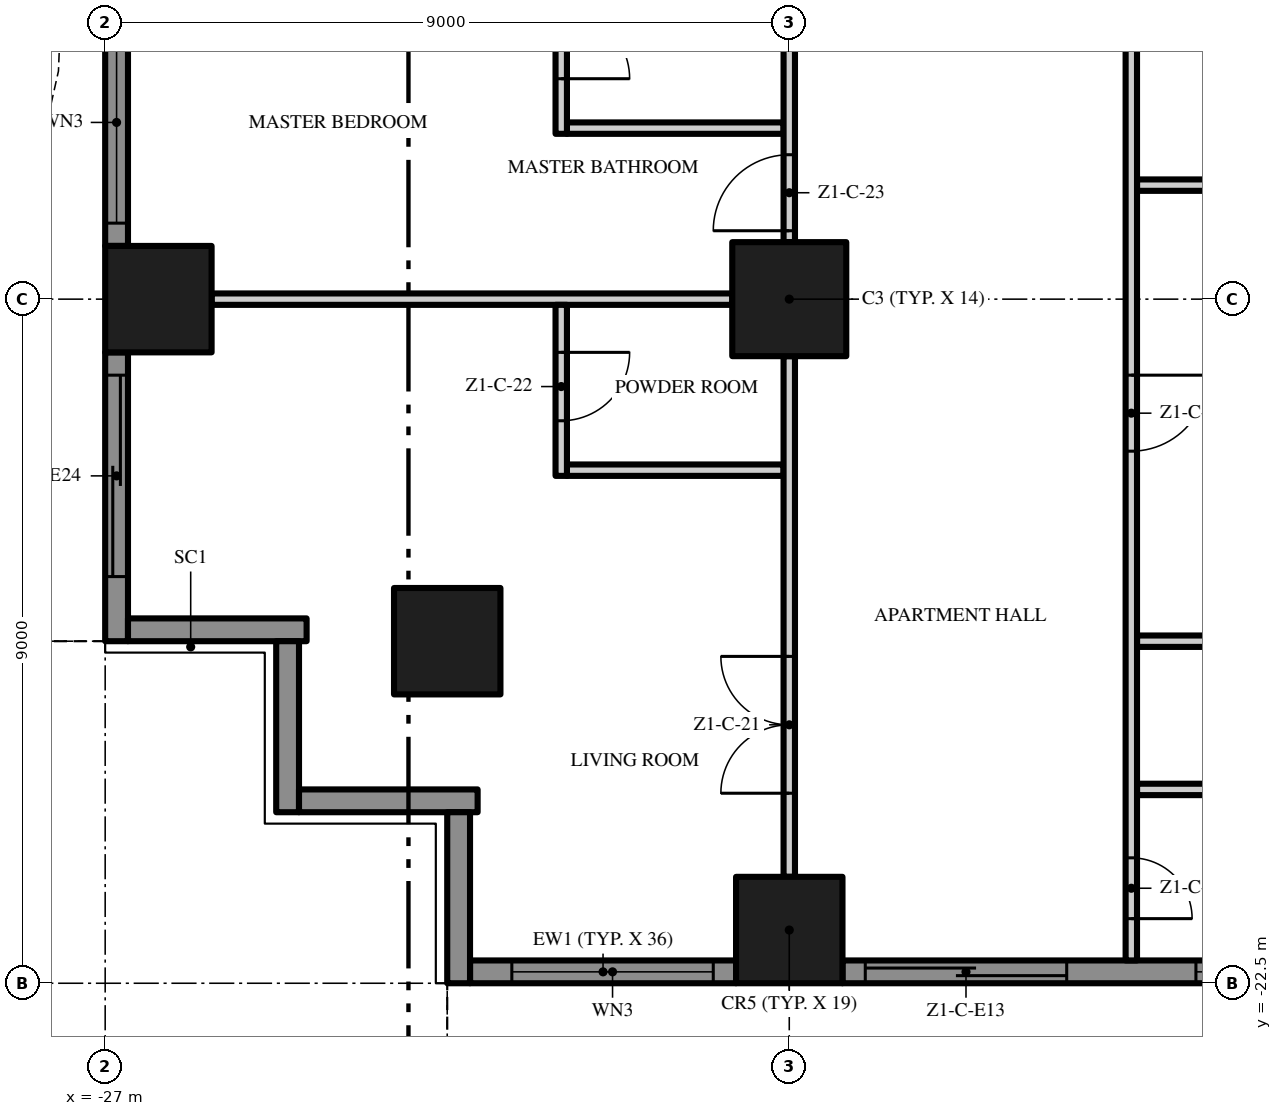
"""IFC4 building model, lengths in metres.
Left out: names, types, materials, properties, quantities, classifications, styles, units other than length and angle.
Written with IfcOpenShell. Run it as: python <this file> out.ifc"""

import sys

from ifc_helpers import new_model, si_unit, direction, frame, frame_2d, origin, origin_2d, place, context, subcontext, project, spatial, polyline, rectangle, outline, extrude, element, fill, save


model = new_model("IFC4")
c1 = context("Model", 3, precision=1e-05, world=origin(), true_north=direction((0.0, 1.0)))
c2 = subcontext(c1, "Body", "Model", "MODEL_VIEW")
j1 = project(units=[si_unit("LENGTHUNIT", "METRE"), si_unit("PLANEANGLEUNIT", "RADIAN")], contexts=[c1])
p1 = place(None, origin())
s1 = spatial("IfcSite", under=j1, at=p1, CompositionType="ELEMENT")
p2 = place(p1, origin())
s2 = spatial("IfcBuilding", under=s1, at=p2, CompositionType="ELEMENT")
p3 = place(p2, frame((0.0, 0.0, 41.6)))
s3 = spatial("IfcBuildingStorey", under=s2, at=p3, CompositionType="ELEMENT", Elevation=41.6)
p4 = place(p3, frame((-18.0, -13.5, 0.0), z_axis=(0.0, 0.0, 1.0), x_axis=(1.0, 0.0, 0.0)))
e1 = element("IfcColumn", 1, at=p4, inside=s3, PredefinedType="COLUMN", context=c2, shape_type="SweptSolid", body=[
    extrude(rectangle(XDim=1.5, YDim=1.5, at=origin_2d()), origin(), (0.0, 0.0, 1.0), 3.5),
])
for number, where, z_axis, x_axis in (
    (2, (-18.0, -21.8, 0.0), (0.0, 0.0, 1.0), (1.0, 0.0, 0.0)),
    (3, (-26.3, -13.5, 0.0), (0.0, 0.0, 1.0), (1.0, 0.0, 0.0)),
    (4, (-22.5, -18.0, 0.0), (0.0, 0.0, 1.0), (1.0, 0.0, 0.0)),
):
    element("IfcColumn", number, at=place(p3, frame(where, z_axis=z_axis, x_axis=x_axis)), inside=s3, PredefinedType="COLUMN", context=c2, shape_type="SweptSolid", body=[
        extrude(rectangle(XDim=1.4, YDim=1.4, at=origin_2d()), origin(), (0.0, 0.0, 1.0), 3.5),
    ])
p5 = place(p3, frame((-18.7, -22.35, 0.0), z_axis=(0.0, 0.0, 1.0), x_axis=(-1.0, 0.0, 0.0)))
e5 = element("IfcWall", 5, at=p5, inside=s3, PredefinedType="SOLIDWALL", context=c2, shape_type="SweptSolid", body=[
    extrude(rectangle(XDim=3.5, YDim=0.3, at=frame_2d((1.75, 0.0))), origin(), (0.0, 0.0, 1.0), 3.5),
])
p6 = place(p5, frame((0.3, 0.0, 0.45)))
e6 = element("IfcOpeningElement", 6, at=p6, cuts=e5, PredefinedType="OPENING", context=c2, shape_type="SweptSolid", body=[
    extrude(rectangle(XDim=2.65, YDim=2.65, at=frame_2d((1.325, 1.325))), frame((0.0, 0.16, 0.0), z_axis=(0.0, -1.0, 0.0), x_axis=(1.0, 0.0, 0.0)), (0.0, 0.0, 1.0), 0.32),
])
p7 = place(p3, frame((-9.7, -22.35, 0.0), z_axis=(0.0, 0.0, 1.0), x_axis=(-1.0, 0.0, 0.0)))
e7 = element("IfcWall", 7, at=p7, inside=s3, PredefinedType="SOLIDWALL", context=c2, shape_type="SweptSolid", body=[
    extrude(rectangle(XDim=7.6, YDim=0.3, at=frame_2d((3.8, 0.0))), origin(), (0.0, 0.0, 1.0), 3.5),
])
p8 = place(p7, frame((4.65, 0.0, 0.0)))
e8 = element("IfcOpeningElement", 8, at=p8, cuts=e7, PredefinedType="OPENING", context=c2, shape_type="SweptSolid", body=[
    extrude(rectangle(XDim=2.65, YDim=2.4, at=frame_2d((1.325, 1.2))), frame((0.0, 0.16, 0.0), z_axis=(0.0, -1.0, 0.0), x_axis=(1.0, 0.0, 0.0)), (0.0, 0.0, 1.0), 0.32),
])
p9 = place(p7, frame((0.3, 0.0, 0.45)))
e9 = element("IfcOpeningElement", 9, at=p9, cuts=e7, PredefinedType="OPENING", context=c2, shape_type="SweptSolid", body=[
    extrude(rectangle(XDim=2.65, YDim=2.65, at=frame_2d((1.325, 1.325))), frame((0.0, 0.16, 0.0), z_axis=(0.0, -1.0, 0.0), x_axis=(1.0, 0.0, 0.0)), (0.0, 0.0, 1.0), 0.32),
])
p10 = place(p3, frame((-26.85, -12.8, 0.0), z_axis=(0.0, 0.0, 1.0), x_axis=(0.0, 1.0, 0.0)))
e10 = element("IfcWall", 10, at=p10, inside=s3, PredefinedType="SOLIDWALL", context=c2, shape_type="SweptSolid", body=[
    extrude(rectangle(XDim=7.6, YDim=0.3, at=frame_2d((3.8, 0.0))), origin(), (0.0, 0.0, 1.0), 3.5),
])
p11 = place(p10, frame((4.65, 0.0, 0.45)))
e11 = element("IfcOpeningElement", 11, at=p11, cuts=e10, PredefinedType="OPENING", context=c2, shape_type="SweptSolid", body=[
    extrude(rectangle(XDim=2.65, YDim=2.65, at=frame_2d((1.325, 1.325))), frame((0.0, 0.16, 0.0), z_axis=(0.0, -1.0, 0.0), x_axis=(1.0, 0.0, 0.0)), (0.0, 0.0, 1.0), 0.32),
])
p12 = place(p10, frame((0.3, 0.0, 0.45)))
e12 = element("IfcOpeningElement", 12, at=p12, cuts=e10, PredefinedType="OPENING", context=c2, shape_type="SweptSolid", body=[
    extrude(rectangle(XDim=2.65, YDim=2.65, at=frame_2d((1.325, 1.325))), frame((0.0, 0.16, 0.0), z_axis=(0.0, -1.0, 0.0), x_axis=(1.0, 0.0, 0.0)), (0.0, 0.0, 1.0), 0.32),
])
p13 = place(p3, frame((-26.85, -18.0, 0.0), z_axis=(0.0, 0.0, 1.0), x_axis=(0.0, 1.0, 0.0)))
e13 = element("IfcWall", 13, at=p13, inside=s3, PredefinedType="SOLIDWALL", context=c2, shape_type="SweptSolid", body=[
    extrude(rectangle(XDim=3.8, YDim=0.3, at=frame_2d((1.9, 0.0))), origin(), (0.0, 0.0, 1.0), 3.5),
])
p14 = place(p13, frame((0.85, 0.0, 0.0)))
e14 = element("IfcOpeningElement", 14, at=p14, cuts=e13, PredefinedType="OPENING", context=c2, shape_type="SweptSolid", body=[
    extrude(rectangle(XDim=2.65, YDim=2.4, at=frame_2d((1.325, 1.2))), frame((0.0, 0.16, 0.0), z_axis=(0.0, -1.0, 0.0), x_axis=(1.0, 0.0, 0.0)), (0.0, 0.0, 1.0), 0.32),
])
p15 = place(p3, frame((-24.35, -17.85, 0.0), z_axis=(0.0, 0.0, 1.0), x_axis=(-1.0, 0.0, 0.0)))
e15 = element("IfcWall", 15, at=p15, inside=s3, PredefinedType="SOLIDWALL", context=c2, shape_type="SweptSolid", body=[
    extrude(rectangle(XDim=2.35, YDim=0.3, at=frame_2d((1.175, 0.0))), origin(), (0.0, 0.0, 1.0), 3.5),
])
p16 = place(p3, frame((-24.6, -20.25, 0.0), z_axis=(0.0, 0.0, 1.0), x_axis=(0.0, 1.0, 0.0)))
e16 = element("IfcWall", 16, at=p16, inside=s3, PredefinedType="SOLIDWALL", context=c2, shape_type="SweptSolid", body=[
    extrude(rectangle(XDim=2.25, YDim=0.3, at=frame_2d((1.125, 0.0))), origin(), (0.0, 0.0, 1.0), 3.5),
])
p17 = place(p3, frame((-22.1, -20.1, 0.0), z_axis=(0.0, 0.0, 1.0), x_axis=(-1.0, 0.0, 0.0)))
e17 = element("IfcWall", 17, at=p17, inside=s3, PredefinedType="SOLIDWALL", context=c2, shape_type="SweptSolid", body=[
    extrude(rectangle(XDim=2.35, YDim=0.3, at=frame_2d((1.175, 0.0))), origin(), (0.0, 0.0, 1.0), 3.5),
])
p18 = place(p3, frame((-22.35, -22.5, 0.0), z_axis=(0.0, 0.0, 1.0), x_axis=(0.0, 1.0, 0.0)))
e18 = element("IfcWall", 18, at=p18, inside=s3, PredefinedType="SOLIDWALL", context=c2, shape_type="SweptSolid", body=[
    extrude(rectangle(XDim=2.25, YDim=0.3, at=frame_2d((1.125, 0.0))), origin(), (0.0, 0.0, 1.0), 3.5),
])
p19 = place(p3, origin())
e19 = element("IfcWall", 19, at=p19, inside=s3, PredefinedType="USERDEFINED", context=c2, shape_type="SweptSolid", body=[
    extrude(outline(polyline([(-22.5, -23.451), (-21.0, -24.112), (-19.5, -24.845), (-18.0, -25.369), (-16.875, -25.5), (-16.5, -25.485), (-15.0, -25.149), (-13.5, -24.488), (-12.0, -23.755), (-10.5, -23.231), (-9.375, -23.1), (-9.0, -23.115), (-7.5, -23.451), (-6.0, -24.112), (-4.5, -24.845), (-3.0, -25.369), (-1.875, -25.5), (-1.5, -25.485), (0.0, -25.149), (1.5, -24.488), (3.0, -23.755), (4.5, -23.231), (5.625, -23.1), (6.0, -23.115), (7.5, -23.451), (9.0, -24.112), (10.5, -24.845), (12.0, -25.369), (13.125, -25.5), (13.5, -25.485), (15.0, -25.149), (16.5, -24.488), (18.0, -23.755), (19.5, -23.231), (20.625, -23.1), (21.0, -23.115), (22.5, -23.451), (22.555, -23.208), (21.033, -22.866), (20.615, -22.849), (19.444, -22.986), (17.904, -23.524), (16.395, -24.261), (14.921, -24.91), (13.467, -25.236), (13.135, -25.249), (12.056, -25.124), (10.596, -24.614), (9.105, -23.885), (7.579, -23.213), (6.033, -22.866), (5.615, -22.849), (4.444, -22.986), (2.904, -23.524), (1.395, -24.261), (-0.079, -24.91), (-1.533, -25.236), (-1.865, -25.249), (-2.944, -25.124), (-4.404, -24.614), (-5.895, -23.885), (-7.421, -23.213), (-8.967, -22.866), (-9.385, -22.849), (-10.556, -22.986), (-12.096, -23.524), (-13.605, -24.261), (-15.079, -24.91), (-16.533, -25.236), (-16.865, -25.249), (-17.944, -25.124), (-19.404, -24.614), (-20.895, -23.885), (-22.399, -23.223), (-22.5, -23.451)])), origin(), (0.0, 0.0, 1.0), 0.9),
])
p20 = place(p3, origin())
e20 = element("IfcWall", 20, at=p20, inside=s3, PredefinedType="USERDEFINED", context=c2, shape_type="SweptSolid", body=[
    extrude(outline(polyline([(-27.951, 18.0), (-28.612, 16.5), (-29.345, 15.0), (-29.869, 13.5), (-30.0, 12.375), (-29.985, 12.0), (-29.649, 10.5), (-28.988, 9.0), (-28.255, 7.5), (-27.731, 6.0), (-27.6, 4.875), (-27.615, 4.5), (-27.951, 3.0), (-28.612, 1.5), (-29.345, 0.0), (-29.869, -1.5), (-30.0, -2.625), (-29.985, -3.0), (-29.649, -4.5), (-28.988, -6.0), (-28.255, -7.5), (-27.731, -9.0), (-27.6, -10.125), (-27.615, -10.5), (-27.951, -12.0), (-28.612, -13.5), (-29.345, -15.0), (-29.869, -16.5), (-30.0, -17.625), (-29.985, -18.0), (-29.735, -17.99), (-29.749, -17.635), (-29.624, -16.556), (-29.114, -15.096), (-28.385, -13.605), (-27.713, -12.079), (-27.366, -10.533), (-27.349, -10.115), (-27.486, -8.944), (-28.024, -7.404), (-28.761, -5.895), (-29.41, -4.421), (-29.736, -2.967), (-29.749, -2.635), (-29.624, -1.556), (-29.114, -0.096), (-28.385, 1.395), (-27.713, 2.921), (-27.366, 4.467), (-27.349, 4.885), (-27.486, 6.056), (-28.024, 7.596), (-28.761, 9.105), (-29.41, 10.579), (-29.736, 12.033), (-29.749, 12.365), (-29.624, 13.444), (-29.114, 14.904), (-28.385, 16.395), (-27.723, 17.899), (-27.951, 18.0)])), origin(), (0.0, 0.0, 1.0), 0.9),
])
for number, where, z_axis, x_axis in (
    (21, (-13.425, -19.95, 0.0), (0.0, 0.0, 1.0), (1.0, 0.0, 0.0)),
    (22, (-13.425, -18.0, 0.0), (0.0, 0.0, 1.0), (1.0, 0.0, 0.0)),
):
    element("IfcWall", number, at=place(p3, frame(where, z_axis=z_axis, x_axis=x_axis)), inside=s3, PredefinedType="PARTITIONING", context=c2, shape_type="SweptSolid", body=[
        extrude(rectangle(XDim=4.35, YDim=0.15, at=frame_2d((2.175, 0.0))), origin(), (0.0, 0.0, 1.0), 3.5),
    ])
p21 = place(p3, frame((-20.925, -15.75, 0.0), z_axis=(0.0, 0.0, 1.0), x_axis=(1.0, 0.0, 0.0)))
e23 = element("IfcWall", 23, at=p21, inside=s3, PredefinedType="PARTITIONING", context=c2, shape_type="SweptSolid", body=[
    extrude(rectangle(XDim=2.85, YDim=0.15, at=frame_2d((1.425, 0.0))), origin(), (0.0, 0.0, 1.0), 3.5),
])
p22 = place(p3, frame((-25.6, -13.5, 0.0), z_axis=(0.0, 0.0, 1.0), x_axis=(1.0, 0.0, 0.0)))
e24 = element("IfcWall", 24, at=p22, inside=s3, PredefinedType="PARTITIONING", context=c2, shape_type="SweptSolid", body=[
    extrude(rectangle(XDim=6.85, YDim=0.15, at=frame_2d((3.425, 0.0))), origin(), (0.0, 0.0, 1.0), 3.5),
])
p23 = place(p3, frame((-13.425, -12.0, 0.0), z_axis=(0.0, 0.0, 1.0), x_axis=(1.0, 0.0, 0.0)))
e25 = element("IfcWall", 25, at=p23, inside=s3, PredefinedType="PARTITIONING", context=c2, shape_type="SweptSolid", body=[
    extrude(rectangle(XDim=4.35, YDim=0.15, at=frame_2d((2.175, 0.0))), origin(), (0.0, 0.0, 1.0), 3.5),
])
p24 = place(p3, frame((-20.925, -11.25, 0.0), z_axis=(0.0, 0.0, 1.0), x_axis=(1.0, 0.0, 0.0)))
e26 = element("IfcWall", 26, at=p24, inside=s3, PredefinedType="PARTITIONING", context=c2, shape_type="SweptSolid", body=[
    extrude(rectangle(XDim=2.85, YDim=0.15, at=frame_2d((1.425, 0.0))), origin(), (0.0, 0.0, 1.0), 3.5),
])
p25 = place(p3, frame((-21.0, -13.575, 0.0), z_axis=(0.0, 0.0, 1.0), x_axis=(0.0, -1.0, 0.0)))
e27 = element("IfcWall", 27, at=p25, inside=s3, PredefinedType="PARTITIONING", context=c2, shape_type="SweptSolid", body=[
    extrude(rectangle(XDim=2.25, YDim=0.15, at=frame_2d((1.125, 0.0))), origin(), (0.0, 0.0, 1.0), 3.5),
])
p26 = place(p25, frame((0.625, 0.0, 0.0)))
e28 = element("IfcOpeningElement", 28, at=p26, cuts=e27, PredefinedType="OPENING", context=c2, shape_type="SweptSolid", body=[
    extrude(rectangle(XDim=0.9, YDim=2.1, at=frame_2d((0.45, 1.05))), frame((0.0, 0.085, 0.0), z_axis=(0.0, -1.0, 0.0), x_axis=(1.0, 0.0, 0.0)), (0.0, 0.0, 1.0), 0.17),
])
p27 = place(p3, frame((-21.0, -6.675, 0.0), z_axis=(0.0, 0.0, 1.0), x_axis=(0.0, -1.0, 0.0)))
e29 = element("IfcWall", 29, at=p27, inside=s3, PredefinedType="PARTITIONING", context=c2, shape_type="SweptSolid", body=[
    extrude(rectangle(XDim=4.65, YDim=0.15, at=frame_2d((2.325, 0.0))), origin(), (0.0, 0.0, 1.0), 3.5),
])
p28 = place(p27, frame((3.025, 0.0, 0.0)))
e30 = element("IfcOpeningElement", 30, at=p28, cuts=e29, PredefinedType="OPENING", context=c2, shape_type="SweptSolid", body=[
    extrude(rectangle(XDim=0.9, YDim=2.1, at=frame_2d((0.45, 1.05))), frame((0.0, 0.085, 0.0), z_axis=(0.0, -1.0, 0.0), x_axis=(1.0, 0.0, 0.0)), (0.0, 0.0, 1.0), 0.17),
])
p29 = place(p27, frame((0.725, 0.0, 0.0)))
e31 = element("IfcOpeningElement", 31, at=p29, cuts=e29, PredefinedType="OPENING", context=c2, shape_type="SweptSolid", body=[
    extrude(rectangle(XDim=0.9, YDim=2.1, at=frame_2d((0.45, 1.05))), frame((0.0, 0.085, 0.0), z_axis=(0.0, -1.0, 0.0), x_axis=(1.0, 0.0, 0.0)), (0.0, 0.0, 1.0), 0.17),
])
p30 = place(p3, frame((-18.0, -21.1, 0.0), z_axis=(0.0, 0.0, 1.0), x_axis=(0.0, 1.0, 0.0)))
e32 = element("IfcWall", 32, at=p30, inside=s3, PredefinedType="PARTITIONING", context=c2, shape_type="SweptSolid", body=[
    extrude(rectangle(XDim=6.85, YDim=0.15, at=frame_2d((3.425, 0.0))), origin(), (0.0, 0.0, 1.0), 3.5),
])
p31 = place(p30, frame((1.1, 0.0, 0.0)))
e33 = element("IfcOpeningElement", 33, at=p31, cuts=e32, PredefinedType="OPENING", context=c2, shape_type="SweptSolid", body=[
    extrude(rectangle(XDim=1.8, YDim=2.4, at=frame_2d((0.9, 1.2))), frame((0.0, 0.085, 0.0), z_axis=(0.0, -1.0, 0.0), x_axis=(1.0, 0.0, 0.0)), (0.0, 0.0, 1.0), 0.17),
])
p32 = place(p3, frame((-18.0, -12.75, 0.0), z_axis=(0.0, 0.0, 1.0), x_axis=(0.0, 1.0, 0.0)))
e34 = element("IfcWall", 34, at=p32, inside=s3, PredefinedType="PARTITIONING", context=c2, shape_type="SweptSolid", body=[
    extrude(rectangle(XDim=7.5, YDim=0.15, at=frame_2d((3.75, 0.0))), origin(), (0.0, 0.0, 1.0), 3.5),
])
p33 = place(p32, frame((0.15, 0.0, 0.0)))
e35 = element("IfcOpeningElement", 35, at=p33, cuts=e34, PredefinedType="OPENING", context=c2, shape_type="SweptSolid", body=[
    extrude(rectangle(XDim=1.0, YDim=2.4, at=frame_2d((0.5, 1.2))), frame((0.0, 0.085, 0.0), z_axis=(0.0, -1.0, 0.0), x_axis=(1.0, 0.0, 0.0)), (0.0, 0.0, 1.0), 0.17),
])
p34 = place(p32, frame((6.35, 0.0, 0.0)))
e36 = element("IfcOpeningElement", 36, at=p34, cuts=e34, PredefinedType="OPENING", context=c2, shape_type="SweptSolid", body=[
    extrude(rectangle(XDim=1.0, YDim=2.4, at=frame_2d((0.5, 1.2))), frame((0.0, 0.085, 0.0), z_axis=(0.0, -1.0, 0.0), x_axis=(1.0, 0.0, 0.0)), (0.0, 0.0, 1.0), 0.17),
])
p35 = place(p3, frame((-13.5, -9.675, 0.0), z_axis=(0.0, 0.0, 1.0), x_axis=(0.0, -1.0, 0.0)))
e37 = element("IfcWall", 37, at=p35, inside=s3, PredefinedType="PARTITIONING", context=c2, shape_type="SweptSolid", body=[
    extrude(rectangle(XDim=12.525, YDim=0.15, at=frame_2d((6.263, 0.0))), origin(), (0.0, 0.0, 1.0), 3.5),
])
p36 = place(p35, frame((11.175, 0.0, 0.0)))
e38 = element("IfcOpeningElement", 38, at=p36, cuts=e37, PredefinedType="OPENING", context=c2, shape_type="SweptSolid", body=[
    extrude(rectangle(XDim=0.8, YDim=2.0, at=frame_2d((0.4, 1.0))), frame((0.0, 0.085, 0.0), z_axis=(0.0, -1.0, 0.0), x_axis=(1.0, 0.0, 0.0)), (0.0, 0.0, 1.0), 0.17),
])
p37 = place(p35, frame((4.825, 0.0, 0.0)))
e39 = element("IfcOpeningElement", 39, at=p37, cuts=e37, PredefinedType="OPENING", context=c2, shape_type="SweptSolid", body=[
    extrude(rectangle(XDim=1.0, YDim=2.4, at=frame_2d((0.5, 1.2))), frame((0.0, 0.085, 0.0), z_axis=(0.0, -1.0, 0.0), x_axis=(1.0, 0.0, 0.0)), (0.0, 0.0, 1.0), 0.17),
])
p38 = place(p6, origin())
e40 = element("IfcWindow", 40, at=p38, inside=s3, PartitioningType="SINGLE_PANEL", PredefinedType="WINDOW", context=c2, shape_type="SweptSolid", body=[
    extrude(rectangle(XDim=2.65, YDim=2.65, at=frame_2d((1.325, 1.325))), frame((0.0, 0.03, 0.0), z_axis=(0.0, -1.0, 0.0), x_axis=(1.0, 0.0, 0.0)), (0.0, 0.0, 1.0), 0.06),
])
fill(e6, e40)
p39 = place(p8, origin())
e41 = element("IfcDoor", 41, at=p39, inside=s3, OperationType="SINGLE_SWING_LEFT", PredefinedType="DOOR", context=c2, shape_type="SweptSolid", body=[
    extrude(rectangle(XDim=2.65, YDim=2.4, at=frame_2d((1.325, 1.2))), frame((0.0, 0.025, 0.0), z_axis=(0.0, -1.0, 0.0), x_axis=(1.0, 0.0, 0.0)), (0.0, 0.0, 1.0), 0.05),
])
fill(e8, e41)
p40 = place(p9, origin())
e42 = element("IfcWindow", 42, at=p40, inside=s3, PartitioningType="SINGLE_PANEL", PredefinedType="WINDOW", context=c2, shape_type="SweptSolid", body=[
    extrude(rectangle(XDim=2.65, YDim=2.65, at=frame_2d((1.325, 1.325))), frame((0.0, 0.03, 0.0), z_axis=(0.0, -1.0, 0.0), x_axis=(1.0, 0.0, 0.0)), (0.0, 0.0, 1.0), 0.06),
])
fill(e9, e42)
p41 = place(p12, origin())
e43 = element("IfcWindow", 43, at=p41, inside=s3, PartitioningType="SINGLE_PANEL", PredefinedType="WINDOW", context=c2, shape_type="SweptSolid", body=[
    extrude(rectangle(XDim=2.65, YDim=2.65, at=frame_2d((1.325, 1.325))), frame((0.0, 0.03, 0.0), z_axis=(0.0, -1.0, 0.0), x_axis=(1.0, 0.0, 0.0)), (0.0, 0.0, 1.0), 0.06),
])
fill(e12, e43)
p42 = place(p14, origin())
e44 = element("IfcDoor", 44, at=p42, inside=s3, OperationType="SINGLE_SWING_LEFT", PredefinedType="DOOR", context=c2, shape_type="SweptSolid", body=[
    extrude(rectangle(XDim=2.65, YDim=2.4, at=frame_2d((1.325, 1.2))), frame((0.0, 0.025, 0.0), z_axis=(0.0, -1.0, 0.0), x_axis=(1.0, 0.0, 0.0)), (0.0, 0.0, 1.0), 0.05),
])
fill(e14, e44)
p43 = place(p36, origin())
e45 = element("IfcDoor", 45, at=p43, inside=s3, OperationType="SINGLE_SWING_RIGHT", PredefinedType="DOOR", context=c2, shape_type="SweptSolid", body=[
    extrude(rectangle(XDim=0.8, YDim=2.0, at=frame_2d((0.4, 1.0))), frame((0.0, 0.025, 0.0), z_axis=(0.0, -1.0, 0.0), x_axis=(1.0, 0.0, 0.0)), (0.0, 0.0, 1.0), 0.05),
])
fill(e38, e45)
p44 = place(p37, origin())
e46 = element("IfcDoor", 46, at=p44, inside=s3, OperationType="SINGLE_SWING_LEFT", PredefinedType="DOOR", context=c2, shape_type="SweptSolid", body=[
    extrude(rectangle(XDim=1.0, YDim=2.4, at=frame_2d((0.5, 1.2))), frame((0.0, 0.025, 0.0), z_axis=(0.0, -1.0, 0.0), x_axis=(1.0, 0.0, 0.0)), (0.0, 0.0, 1.0), 0.05),
])
fill(e39, e46)
p45 = place(p31, origin())
e47 = element("IfcDoor", 47, at=p45, inside=s3, OperationType="DOUBLE_DOOR_SINGLE_SWING", PredefinedType="DOOR", context=c2, shape_type="SweptSolid", body=[
    extrude(rectangle(XDim=1.8, YDim=2.4, at=frame_2d((0.9, 1.2))), frame((0.0, 0.025, 0.0), z_axis=(0.0, -1.0, 0.0), x_axis=(1.0, 0.0, 0.0)), (0.0, 0.0, 1.0), 0.05),
])
fill(e33, e47)
p46 = place(p26, origin())
e48 = element("IfcDoor", 48, at=p46, inside=s3, OperationType="SINGLE_SWING_LEFT", PredefinedType="DOOR", context=c2, shape_type="SweptSolid", body=[
    extrude(rectangle(XDim=0.9, YDim=2.1, at=frame_2d((0.45, 1.05))), frame((0.0, 0.025, 0.0), z_axis=(0.0, -1.0, 0.0), x_axis=(1.0, 0.0, 0.0)), (0.0, 0.0, 1.0), 0.05),
])
fill(e28, e48)
p47 = place(p33, origin())
e49 = element("IfcDoor", 49, at=p47, inside=s3, OperationType="SINGLE_SWING_LEFT", PredefinedType="DOOR", context=c2, shape_type="SweptSolid", body=[
    extrude(rectangle(XDim=1.0, YDim=2.4, at=frame_2d((0.5, 1.2))), frame((0.0, 0.025, 0.0), z_axis=(0.0, -1.0, 0.0), x_axis=(1.0, 0.0, 0.0)), (0.0, 0.0, 1.0), 0.05),
])
fill(e35, e49)
p48 = place(p28, origin())
e50 = element("IfcDoor", 50, at=p48, inside=s3, OperationType="SINGLE_SWING_RIGHT", PredefinedType="DOOR", context=c2, shape_type="SweptSolid", body=[
    extrude(rectangle(XDim=0.9, YDim=2.1, at=frame_2d((0.45, 1.05))), frame((0.0, 0.025, 0.0), z_axis=(0.0, -1.0, 0.0), x_axis=(1.0, 0.0, 0.0)), (0.0, 0.0, 1.0), 0.05),
])
fill(e30, e50)
save(model, sys.argv[1])
